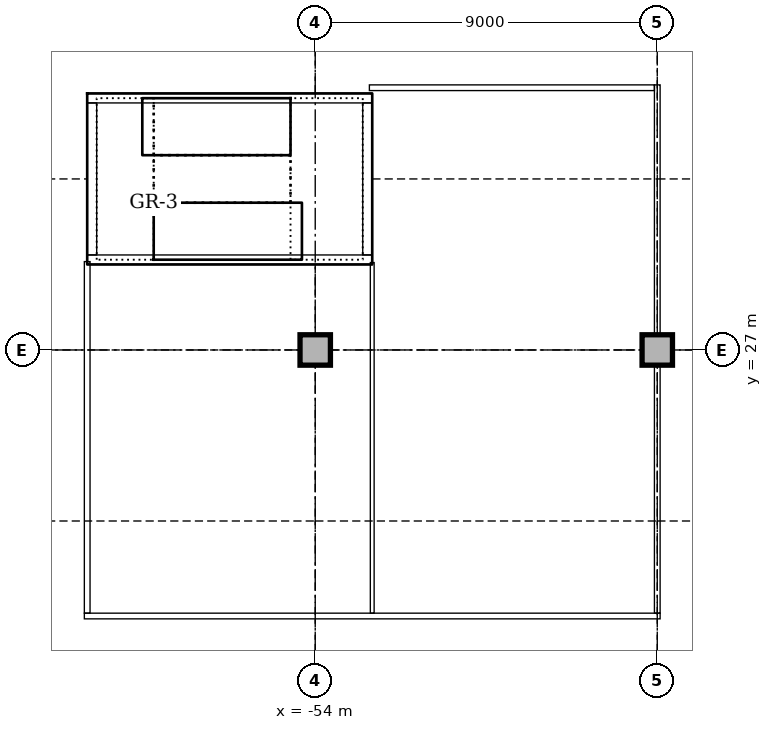
"""IFC4 building model, lengths in metres.
Left out: names, types, materials, properties, quantities, classifications, styles, units other than length and angle.
Written with IfcOpenShell. Run it as: python <this file> out.ifc"""

import sys

from ifc_helpers import new_model, si_unit, direction, frame, frame_2d, origin, origin_2d, place, context, subcontext, project, spatial, rectangle, extrude, element, fill, save


model = new_model("IFC4")
c1 = context("Model", 3, precision=1e-05, world=origin(), true_north=direction((0.0, 1.0)))
c2 = subcontext(c1, "Body", "Model", "MODEL_VIEW")
j1 = project(units=[si_unit("LENGTHUNIT", "METRE"), si_unit("PLANEANGLEUNIT", "RADIAN")], contexts=[c1])
p1 = place(None, origin())
s1 = spatial("IfcSite", under=j1, at=p1, CompositionType="ELEMENT")
p2 = place(p1, origin())
s2 = spatial("IfcBuilding", under=s1, at=p2, CompositionType="ELEMENT")
p3 = place(p2, frame((0.0, 0.0, 26.0)))
s3 = spatial("IfcBuildingStorey", under=s2, at=p3, CompositionType="ELEMENT", Elevation=26.0)
p4 = place(p3, frame((-60.0, 29.375, 0.0), z_axis=(0.0, 0.0, 1.0), x_axis=(1.0, 0.0, 0.0)))
e1 = element("IfcWall", 1, at=p4, inside=s3, PredefinedType="SOLIDWALL", context=c2, shape_type="SweptSolid", body=[
    extrude(rectangle(XDim=7.5, YDim=0.25, at=frame_2d((3.75, 0.0))), origin(), (0.0, 0.0, 1.0), 4.0),
])
p5 = place(p3, frame((-52.5, 33.625, 0.0), z_axis=(0.0, 0.0, 1.0), x_axis=(-1.0, 0.0, 0.0)))
e2 = element("IfcWall", 2, at=p5, inside=s3, PredefinedType="SOLIDWALL", context=c2, shape_type="SweptSolid", body=[
    extrude(rectangle(XDim=7.5, YDim=0.25, at=frame_2d((3.75, 0.0))), origin(), (0.0, 0.0, 1.0), 4.0),
])
p6 = place(p5, frame((6.0, 0.0, 0.0)))
e3 = element("IfcOpeningElement", 3, at=p6, cuts=e2, PredefinedType="OPENING", context=c2, shape_type="SweptSolid", body=[
    extrude(rectangle(XDim=1.0, YDim=2.1, at=frame_2d((0.5, 1.05))), frame((0.0, 0.135, 0.0), z_axis=(0.0, -1.0, 0.0), x_axis=(1.0, 0.0, 0.0)), (0.0, 0.0, 1.0), 0.27),
])
for number, where, z_axis, x_axis in (
    (4, (-52.625, 29.5, 0.0), (0.0, 0.0, 1.0), (0.0, 1.0, 0.0)),
    (5, (-59.875, 33.5, 0.0), (0.0, 0.0, 1.0), (0.0, -1.0, 0.0)),
):
    element("IfcWall", number, at=place(p3, frame(where, z_axis=z_axis, x_axis=x_axis)), inside=s3, PredefinedType="SOLIDWALL", context=c2, shape_type="SweptSolid", body=[
        extrude(rectangle(XDim=4.0, YDim=0.25, at=frame_2d((2.0, 0.0))), origin(), (0.0, 0.0, 1.0), 4.0),
    ])
for number, where, z_axis, x_axis in (
    (6, (-54.0, 27.0, 0.0), (0.0, 0.0, 1.0), (1.0, 0.0, 0.0)),
    (7, (-45.0, 27.0, 0.0), (0.0, 0.0, 1.0), (1.0, 0.0, 0.0)),
):
    element("IfcColumn", number, at=place(p3, frame(where, z_axis=z_axis, x_axis=x_axis)), inside=s3, PredefinedType="COLUMN", context=c2, shape_type="SweptSolid", body=[
        extrude(rectangle(XDim=0.8, YDim=0.8, at=origin_2d()), origin(), (0.0, 0.0, 1.0), 3.85),
    ])
p7 = place(p3, frame((-60.075, 20.0, 0.0), z_axis=(0.0, 0.0, 1.0), x_axis=(1.0, 0.0, 0.0)))
e8 = element("IfcWall", 8, at=p7, inside=s3, PredefinedType="PARTITIONING", context=c2, shape_type="SweptSolid", body=[
    extrude(rectangle(XDim=15.15, YDim=0.15, at=frame_2d((7.575, 0.0))), origin(), (0.0, 0.0, 1.0), 3.85),
])
p8 = place(p7, frame((3.4, 0.0, 0.0)))
e9 = element("IfcOpeningElement", 9, at=p8, cuts=e8, PredefinedType="OPENING", context=c2, shape_type="SweptSolid", body=[
    extrude(rectangle(XDim=0.9, YDim=2.1, at=frame_2d((0.45, 1.05))), frame((0.0, 0.085, 0.0), z_axis=(0.0, -1.0, 0.0), x_axis=(1.0, 0.0, 0.0)), (0.0, 0.0, 1.0), 0.17),
])
p9 = place(p3, frame((-45.0, 20.075, 0.0), z_axis=(0.0, 0.0, 1.0), x_axis=(0.0, 1.0, 0.0)))
e10 = element("IfcWall", 10, at=p9, inside=s3, PredefinedType="PARTITIONING", context=c2, shape_type="SweptSolid", body=[
    extrude(rectangle(XDim=6.525, YDim=0.15, at=frame_2d((3.263, 0.0))), origin(), (0.0, 0.0, 1.0), 3.158),
])
p10 = place(p3, frame((-45.0, 27.4, 0.0), z_axis=(0.0, 0.0, 1.0), x_axis=(0.0, 1.0, 0.0)))
e11 = element("IfcWall", 11, at=p10, inside=s3, PredefinedType="PARTITIONING", context=c2, shape_type="SweptSolid", body=[
    extrude(rectangle(XDim=6.575, YDim=0.15, at=frame_2d((3.288, 0.0))), origin(), (0.0, 0.0, 1.0), 3.158),
])
p11 = place(p3, frame((-60.0, 20.075, 0.0), z_axis=(0.0, 0.0, 1.0), x_axis=(0.0, 1.0, 0.0)))
e12 = element("IfcWall", 12, at=p11, inside=s3, PredefinedType="PARTITIONING", context=c2, shape_type="SweptSolid", body=[
    extrude(rectangle(XDim=9.25, YDim=0.15, at=frame_2d((4.625, 0.0))), origin(), (0.0, 0.0, 1.0), 3.85),
])
p12 = place(p3, frame((-52.575, 33.9, 0.0), z_axis=(0.0, 0.0, 1.0), x_axis=(1.0, 0.0, 0.0)))
e13 = element("IfcWall", 13, at=p12, inside=s3, PredefinedType="PARTITIONING", context=c2, shape_type="SweptSolid", body=[
    extrude(rectangle(XDim=7.5, YDim=0.15, at=frame_2d((3.75, 0.0))), origin(), (0.0, 0.0, 1.0), 3.85),
])
p13 = place(p12, frame((3.3, 0.0, 0.0)))
e14 = element("IfcOpeningElement", 14, at=p13, cuts=e13, PredefinedType="OPENING", context=c2, shape_type="SweptSolid", body=[
    extrude(rectangle(XDim=0.9, YDim=2.1, at=frame_2d((0.45, 1.05))), frame((0.0, 0.085, 0.0), z_axis=(0.0, -1.0, 0.0), x_axis=(1.0, 0.0, 0.0)), (0.0, 0.0, 1.0), 0.17),
])
p14 = place(p3, frame((-52.5, 20.075, 0.0), z_axis=(0.0, 0.0, 1.0), x_axis=(0.0, 1.0, 0.0)))
e15 = element("IfcWall", 15, at=p14, inside=s3, PredefinedType="PARTITIONING", context=c2, shape_type="SweptSolid", body=[
    extrude(rectangle(XDim=9.225, YDim=0.1, at=frame_2d((4.612, 0.0))), origin(), (0.0, 0.0, 1.0), 3.85),
])
p15 = place(p8, origin())
e16 = element("IfcDoor", 16, at=p15, inside=s3, OperationType="SINGLE_SWING_LEFT", PredefinedType="DOOR", context=c2, shape_type="SweptSolid", body=[
    extrude(rectangle(XDim=0.9, YDim=2.1, at=frame_2d((0.45, 1.05))), frame((0.0, 0.025, 0.0), z_axis=(0.0, -1.0, 0.0), x_axis=(1.0, 0.0, 0.0)), (0.0, 0.0, 1.0), 0.05),
])
fill(e9, e16)
p16 = place(p13, frame((0.9, 0.0, 0.0), z_axis=(0.0, 0.0, 1.0), x_axis=(-1.0, 0.0, 0.0)))
e17 = element("IfcDoor", 17, at=p16, inside=s3, OperationType="SINGLE_SWING_RIGHT", PredefinedType="DOOR", context=c2, shape_type="SweptSolid", body=[
    extrude(rectangle(XDim=0.9, YDim=2.1, at=frame_2d((0.45, 1.05))), frame((0.0, 0.025, 0.0), z_axis=(0.0, -1.0, 0.0), x_axis=(1.0, 0.0, 0.0)), (0.0, 0.0, 1.0), 0.05),
])
fill(e14, e17)
p17 = place(p6, origin())
e18 = element("IfcDoor", 18, at=p17, inside=s3, OperationType="SINGLE_SWING_RIGHT", PredefinedType="DOOR", context=c2, shape_type="SweptSolid", body=[
    extrude(rectangle(XDim=1.0, YDim=2.1, at=frame_2d((0.5, 1.05))), frame((0.0, 0.025, 0.0), z_axis=(0.0, -1.0, 0.0), x_axis=(1.0, 0.0, 0.0)), (0.0, 0.0, 1.0), 0.05),
])
fill(e3, e18)
save(model, sys.argv[1])
